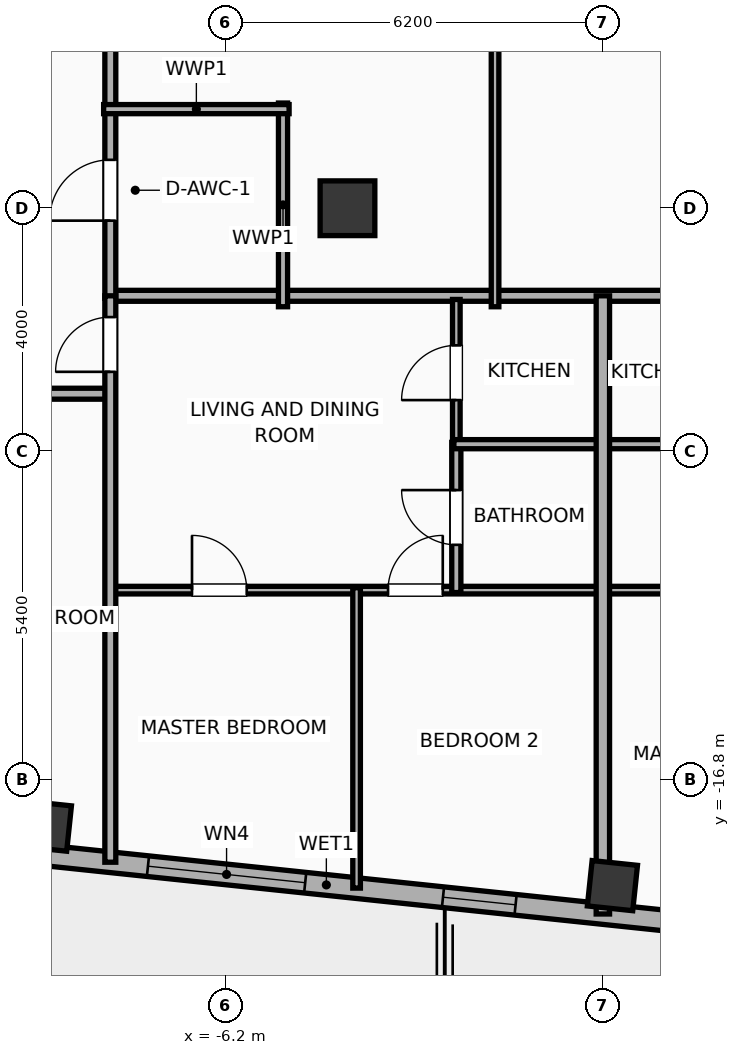
"""IFC4 building model, lengths in metres.
Left out: names, types, materials, properties, quantities, classifications, styles, units other than length and angle.
Written with IfcOpenShell. Run it as: python <this file> out.ifc"""

import sys

from ifc_helpers import new_model, si_unit, direction, frame, frame_2d, origin, origin_2d, place, context, subcontext, project, spatial, rectangle, hollow_rectangle, extrude, element, fill, save


model = new_model("IFC4")
c1 = context("Model", 3, precision=1e-05, world=origin(), true_north=direction((0.0, 1.0)))
c2 = subcontext(c1, "Body", "Model", "MODEL_VIEW")
j1 = project(units=[si_unit("LENGTHUNIT", "METRE"), si_unit("PLANEANGLEUNIT", "RADIAN")], contexts=[c1])
p1 = place(None, origin())
s1 = spatial("IfcSite", under=j1, at=p1, CompositionType="ELEMENT")
p2 = place(p1, origin())
s2 = spatial("IfcBuilding", under=s1, at=p2, CompositionType="ELEMENT")
p3 = place(p2, frame((0.0, 0.0, 291.2)))
s3 = spatial("IfcBuildingStorey", under=s2, at=p3, CompositionType="ELEMENT", Elevation=291.2)
p4 = place(p3, frame((-4.2, -7.4, 0.0), z_axis=(0.0, 0.0, 1.0), x_axis=(1.0, 0.0, 0.0)))
e1 = element("IfcColumn", 1, at=p4, inside=s3, PredefinedType="COLUMN", context=c2, shape_type="SweptSolid", body=[
    extrude(rectangle(XDim=0.9, YDim=0.9, at=origin_2d()), origin(), (0.0, 0.0, 1.0), 3.9),
])
for number, where, z_axis, x_axis in (
    (2, (-9.152, -17.561, 0.0), (0.0, 0.0, 1.0), (0.995, -0.105, 0.0)),
    (3, (0.157, -18.54, 0.0), (0.0, 0.0, 1.0), (0.995, -0.105, 0.0)),
):
    element("IfcColumn", number, at=place(p3, frame(where, z_axis=z_axis, x_axis=x_axis)), inside=s3, PredefinedType="COLUMN", context=c2, shape_type="SweptSolid", body=[
        extrude(hollow_rectangle(XDim=0.75, YDim=0.75, WallThickness=0.025, at=origin_2d()), origin(), (0.0, 0.0, 1.0), 3.9),
    ])
p5 = place(p3, frame((18.708, -20.972, 0.0), z_axis=(0.0, 0.0, 1.0), x_axis=(-0.994521888554, 0.104528528102, 0.0)))
e4 = element("IfcWall", 4, at=p5, inside=s3, PredefinedType="ELEMENTEDWALL", context=c2, shape_type="SweptSolid", body=[
    extrude(rectangle(XDim=46.766, YDim=0.34, at=frame_2d((23.383, 0.0))), origin(), (0.0, 0.0, 1.0), 3.635),
])
p6 = place(p5, frame((23.733, 0.0, 0.65)))
e5 = element("IfcOpeningElement", 5, at=p6, cuts=e4, PredefinedType="OPENING", context=c2, shape_type="SweptSolid", body=[
    extrude(rectangle(XDim=2.6, YDim=2.45, at=frame_2d((1.3, 1.225))), frame((0.0, 0.18, 0.0), z_axis=(0.0, -1.0, 0.0), x_axis=(1.0, 0.0, 0.0)), (0.0, 0.0, 1.0), 0.36),
])
p7 = place(p5, frame((44.402, 0.0, 0.75)))
e6 = element("IfcOpeningElement", 6, at=p7, cuts=e4, PredefinedType="OPENING", context=c2, shape_type="SweptSolid", body=[
    extrude(rectangle(XDim=1.2, YDim=2.05, at=frame_2d((0.6, 1.025))), frame((0.0, 0.18, 0.0), z_axis=(0.0, -1.0, 0.0), x_axis=(1.0, 0.0, 0.0)), (0.0, 0.0, 1.0), 0.36),
])
p8 = place(p5, frame((39.54, 0.0, 0.75)))
e7 = element("IfcOpeningElement", 7, at=p8, cuts=e4, PredefinedType="OPENING", context=c2, shape_type="SweptSolid", body=[
    extrude(rectangle(XDim=1.2, YDim=2.05, at=frame_2d((0.6, 1.025))), frame((0.0, 0.18, 0.0), z_axis=(0.0, -1.0, 0.0), x_axis=(1.0, 0.0, 0.0)), (0.0, 0.0, 1.0), 0.36),
])
p9 = place(p5, frame((42.406, 0.0, 0.75)))
e8 = element("IfcOpeningElement", 8, at=p9, cuts=e4, PredefinedType="OPENING", context=c2, shape_type="SweptSolid", body=[
    extrude(rectangle(XDim=1.2, YDim=2.05, at=frame_2d((0.6, 1.025))), frame((0.0, 0.18, 0.0), z_axis=(0.0, -1.0, 0.0), x_axis=(1.0, 0.0, 0.0)), (0.0, 0.0, 1.0), 0.36),
])
p10 = place(p5, frame((34.933, 0.0, 0.75)))
e9 = element("IfcOpeningElement", 9, at=p10, cuts=e4, PredefinedType="OPENING", context=c2, shape_type="SweptSolid", body=[
    extrude(rectangle(XDim=1.2, YDim=2.05, at=frame_2d((0.6, 1.025))), frame((0.0, 0.18, 0.0), z_axis=(0.0, -1.0, 0.0), x_axis=(1.0, 0.0, 0.0)), (0.0, 0.0, 1.0), 0.36),
])
p11 = place(p5, frame((28.631, 0.0, 0.75)))
e10 = element("IfcOpeningElement", 10, at=p11, cuts=e4, PredefinedType="OPENING", context=c2, shape_type="SweptSolid", body=[
    extrude(rectangle(XDim=1.2, YDim=2.05, at=frame_2d((0.6, 1.025))), frame((0.0, 0.18, 0.0), z_axis=(0.0, -1.0, 0.0), x_axis=(1.0, 0.0, 0.0)), (0.0, 0.0, 1.0), 0.36),
])
p12 = place(p5, frame((30.896, 0.0, 0.75)))
e11 = element("IfcOpeningElement", 11, at=p12, cuts=e4, PredefinedType="OPENING", context=c2, shape_type="SweptSolid", body=[
    extrude(rectangle(XDim=1.2, YDim=2.05, at=frame_2d((0.6, 1.025))), frame((0.0, 0.18, 0.0), z_axis=(0.0, -1.0, 0.0), x_axis=(1.0, 0.0, 0.0)), (0.0, 0.0, 1.0), 0.36),
])
p13 = place(p5, frame((7.501, 0.0, 0.75)))
e12 = element("IfcOpeningElement", 12, at=p13, cuts=e4, PredefinedType="OPENING", context=c2, shape_type="SweptSolid", body=[
    extrude(rectangle(XDim=1.2, YDim=2.05, at=frame_2d((0.6, 1.025))), frame((0.0, 0.18, 0.0), z_axis=(0.0, -1.0, 0.0), x_axis=(1.0, 0.0, 0.0)), (0.0, 0.0, 1.0), 0.36),
])
p14 = place(p5, frame((4.159, 0.0, 0.75)))
e13 = element("IfcOpeningElement", 13, at=p14, cuts=e4, PredefinedType="OPENING", context=c2, shape_type="SweptSolid", body=[
    extrude(rectangle(XDim=1.2, YDim=2.05, at=frame_2d((0.6, 1.025))), frame((0.0, 0.18, 0.0), z_axis=(0.0, -1.0, 0.0), x_axis=(1.0, 0.0, 0.0)), (0.0, 0.0, 1.0), 0.36),
])
p15 = place(p5, frame((1.369, 0.0, 0.75)))
e14 = element("IfcOpeningElement", 14, at=p15, cuts=e4, PredefinedType="OPENING", context=c2, shape_type="SweptSolid", body=[
    extrude(rectangle(XDim=1.2, YDim=2.05, at=frame_2d((0.6, 1.025))), frame((0.0, 0.18, 0.0), z_axis=(0.0, -1.0, 0.0), x_axis=(1.0, 0.0, 0.0)), (0.0, 0.0, 1.0), 0.36),
])
p16 = place(p5, frame((20.254, 0.0, 0.75)))
e15 = element("IfcOpeningElement", 15, at=p16, cuts=e4, PredefinedType="OPENING", context=c2, shape_type="SweptSolid", body=[
    extrude(rectangle(XDim=1.2, YDim=2.05, at=frame_2d((0.6, 1.025))), frame((0.0, 0.18, 0.0), z_axis=(0.0, -1.0, 0.0), x_axis=(1.0, 0.0, 0.0)), (0.0, 0.0, 1.0), 0.36),
])
p17 = place(p5, frame((16.172, 0.0, 0.75)))
e16 = element("IfcOpeningElement", 16, at=p17, cuts=e4, PredefinedType="OPENING", context=c2, shape_type="SweptSolid", body=[
    extrude(rectangle(XDim=1.2, YDim=2.05, at=frame_2d((0.6, 1.025))), frame((0.0, 0.18, 0.0), z_axis=(0.0, -1.0, 0.0), x_axis=(1.0, 0.0, 0.0)), (0.0, 0.0, 1.0), 0.36),
])
p18 = place(p5, frame((12.11, 0.0, 0.75)))
e17 = element("IfcOpeningElement", 17, at=p18, cuts=e4, PredefinedType="OPENING", context=c2, shape_type="SweptSolid", body=[
    extrude(rectangle(XDim=1.2, YDim=2.05, at=frame_2d((0.6, 1.025))), frame((0.0, 0.18, 0.0), z_axis=(0.0, -1.0, 0.0), x_axis=(1.0, 0.0, 0.0)), (0.0, 0.0, 1.0), 0.36),
])
p19 = place(p3, frame((-8.15, -8.84, 0.0), z_axis=(0.0, 0.0, 1.0), x_axis=(1.0, 0.0, 0.0)))
e18 = element("IfcWall", 18, at=p19, inside=s3, PredefinedType="PARTITIONING", context=c2, shape_type="SweptSolid", body=[
    extrude(rectangle(XDim=16.3, YDim=0.18, at=frame_2d((8.15, 0.0))), origin(), (0.0, 0.0, 1.0), 3.635),
])
p20 = place(p3, frame((-8.1, -8.88, 0.0), z_axis=(0.0, 0.0, 1.0), x_axis=(0.0, 1.0, 0.0)))
e19 = element("IfcWall", 19, at=p20, inside=s3, PredefinedType="PARTITIONING", context=c2, shape_type="SweptSolid", body=[
    extrude(rectangle(XDim=17.76, YDim=0.18, at=frame_2d((8.88, 0.0))), origin(), (0.0, 0.0, 1.0), 3.635),
])
p21 = place(p20, frame((1.276, 0.0, 0.0)))
e20 = element("IfcOpeningElement", 20, at=p21, cuts=e19, PredefinedType="OPENING", context=c2, shape_type="SweptSolid", body=[
    extrude(rectangle(XDim=1.0, YDim=2.05, at=frame_2d((0.5, 1.025))), frame((0.0, 0.1, 0.0), z_axis=(0.0, -1.0, 0.0), x_axis=(1.0, 0.0, 0.0)), (0.0, 0.0, 1.0), 0.2),
])
p22 = place(p20, frame((10.181, 0.0, 0.0)))
e21 = element("IfcOpeningElement", 21, at=p22, cuts=e19, PredefinedType="OPENING", context=c2, shape_type="SweptSolid", body=[
    extrude(rectangle(XDim=0.95, YDim=2.05, at=frame_2d((0.475, 1.025))), frame((0.0, 0.1, 0.0), z_axis=(0.0, -1.0, 0.0), x_axis=(1.0, 0.0, 0.0)), (0.0, 0.0, 1.0), 0.2),
])
p23 = place(p3, frame((-5.26, -9.02, 0.0), z_axis=(0.0, 0.0, 1.0), x_axis=(0.0, 1.0, 0.0)))
e22 = element("IfcWall", 22, at=p23, inside=s3, PredefinedType="PLUMBINGWALL", context=c2, shape_type="SweptSolid", body=[
    extrude(rectangle(XDim=3.35, YDim=0.15, at=frame_2d((1.675, 0.0))), origin(), (0.0, 0.0, 1.0), 3.635),
])
p24 = place(p3, frame((-8.21, -5.77, 0.0), z_axis=(0.0, 0.0, 1.0), x_axis=(1.0, 0.0, 0.0)))
e23 = element("IfcWall", 23, at=p24, inside=s3, PredefinedType="PLUMBINGWALL", context=c2, shape_type="SweptSolid", body=[
    extrude(rectangle(XDim=3.05, YDim=0.15, at=frame_2d((1.525, 0.0))), origin(), (0.0, 0.0, 1.0), 3.635),
])
p25 = place(p3, frame((-1.773, -9.02, 0.0), z_axis=(0.0, 0.0, 1.0), x_axis=(0.0, 1.0, 0.0)))
e24 = element("IfcWall", 24, at=p25, inside=s3, PredefinedType="PARTITIONING", context=c2, shape_type="SweptSolid", body=[
    extrude(rectangle(XDim=17.99, YDim=0.125, at=frame_2d((8.995, 0.0))), origin(), (0.0, 0.0, 1.0), 3.635),
])
p26 = place(p25, frame((8.52, 0.0, 0.0)))
e25 = element("IfcOpeningElement", 25, at=p26, cuts=e24, PredefinedType="OPENING", context=c2, shape_type="SweptSolid", body=[
    extrude(rectangle(XDim=0.95, YDim=2.05, at=frame_2d((0.475, 1.025))), frame((0.0, 0.073, 0.0), z_axis=(0.0, -1.0, 0.0), x_axis=(1.0, 0.0, 0.0)), (0.0, 0.0, 1.0), 0.145),
])
p27 = place(p3, frame((-30.676, -10.45, 0.0), z_axis=(0.0, 0.0, 1.0), x_axis=(1.0, 0.0, 0.0)))
e26 = element("IfcWall", 26, at=p27, inside=s3, PredefinedType="PARTITIONING", context=c2, shape_type="SweptSolid", body=[
    extrude(rectangle(XDim=22.596, YDim=0.18, at=frame_2d((11.298, 0.0))), origin(), (0.0, 0.0, 1.0), 3.635),
])
p28 = place(p27, frame((2.336, 0.0, 0.0)))
e27 = element("IfcOpeningElement", 27, at=p28, cuts=e26, PredefinedType="OPENING", context=c2, shape_type="SweptSolid", body=[
    extrude(rectangle(XDim=0.9, YDim=2.05, at=frame_2d((0.45, 1.025))), frame((0.0, 0.1, 0.0), z_axis=(0.0, -1.0, 0.0), x_axis=(1.0, 0.0, 0.0)), (0.0, 0.0, 1.0), 0.2),
])
p29 = place(p27, frame((8.861, 0.0, 0.0)))
e28 = element("IfcOpeningElement", 28, at=p29, cuts=e26, PredefinedType="OPENING", context=c2, shape_type="SweptSolid", body=[
    extrude(rectangle(XDim=1.15, YDim=2.05, at=frame_2d((0.575, 1.025))), frame((0.0, 0.1, 0.0), z_axis=(0.0, -1.0, 0.0), x_axis=(1.0, 0.0, 0.0)), (0.0, 0.0, 1.0), 0.2),
])
p30 = place(p27, frame((13.774, 0.0, 0.0)))
e29 = element("IfcOpeningElement", 29, at=p30, cuts=e26, PredefinedType="OPENING", context=c2, shape_type="SweptSolid", body=[
    extrude(rectangle(XDim=0.9, YDim=2.05, at=frame_2d((0.45, 1.025))), frame((0.0, 0.1, 0.0), z_axis=(0.0, -1.0, 0.0), x_axis=(1.0, 0.0, 0.0)), (0.0, 0.0, 1.0), 0.2),
])
p31 = place(p27, frame((20.306, 0.0, 0.0)))
e30 = element("IfcOpeningElement", 30, at=p31, cuts=e26, PredefinedType="OPENING", context=c2, shape_type="SweptSolid", body=[
    extrude(rectangle(XDim=1.15, YDim=2.05, at=frame_2d((0.575, 1.025))), frame((0.0, 0.1, 0.0), z_axis=(0.0, -1.0, 0.0), x_axis=(1.0, 0.0, 0.0)), (0.0, 0.0, 1.0), 0.2),
])
p32 = place(p3, frame((-8.08, -13.68, 0.0), z_axis=(0.0, 0.0, 1.0), x_axis=(1.0, 0.0, 0.0)))
e31 = element("IfcWall", 31, at=p32, inside=s3, PredefinedType="PARTITIONING", context=c2, shape_type="SweptSolid", body=[
    extrude(rectangle(XDim=8.06, YDim=0.125, at=frame_2d((4.03, 0.0))), origin(), (0.0, 0.0, 1.0), 3.635),
])
p33 = place(p32, frame((1.323, 0.0, 0.0)))
e32 = element("IfcOpeningElement", 32, at=p33, cuts=e31, PredefinedType="OPENING", context=c2, shape_type="SweptSolid", body=[
    extrude(rectangle(XDim=0.9, YDim=2.05, at=frame_2d((0.45, 1.025))), frame((0.0, 0.073, 0.0), z_axis=(0.0, -1.0, 0.0), x_axis=(1.0, 0.0, 0.0)), (0.0, 0.0, 1.0), 0.145),
])
p34 = place(p32, frame((4.547, 0.0, 0.0)))
e33 = element("IfcOpeningElement", 33, at=p34, cuts=e31, PredefinedType="OPENING", context=c2, shape_type="SweptSolid", body=[
    extrude(rectangle(XDim=0.9, YDim=2.05, at=frame_2d((0.45, 1.025))), frame((0.0, 0.073, 0.0), z_axis=(0.0, -1.0, 0.0), x_axis=(1.0, 0.0, 0.0)), (0.0, 0.0, 1.0), 0.145),
])
p35 = place(p3, frame((-2.41, -11.31, 0.0), z_axis=(0.0, 0.0, 1.0), x_axis=(0.0, 1.0, 0.0)))
e34 = element("IfcWall", 34, at=p35, inside=s3, PredefinedType="PARTITIONING", context=c2, shape_type="SweptSolid", body=[
    extrude(rectangle(XDim=2.41, YDim=0.125, at=frame_2d((1.205, 0.0))), origin(), (0.0, 0.0, 1.0), 3.635),
])
p36 = place(p35, frame((0.755, 0.0, 0.0)))
e35 = element("IfcOpeningElement", 35, at=p36, cuts=e34, PredefinedType="OPENING", context=c2, shape_type="SweptSolid", body=[
    extrude(rectangle(XDim=0.9, YDim=2.05, at=frame_2d((0.45, 1.025))), frame((0.0, 0.073, 0.0), z_axis=(0.0, -1.0, 0.0), x_axis=(1.0, 0.0, 0.0)), (0.0, 0.0, 1.0), 0.145),
])
p37 = place(p3, frame((-2.41, -13.72, 0.0), z_axis=(0.0, 0.0, 1.0), x_axis=(0.0, 1.0, 0.0)))
e36 = element("IfcWall", 36, at=p37, inside=s3, PredefinedType="PLUMBINGWALL", context=c2, shape_type="SweptSolid", body=[
    extrude(rectangle(XDim=2.47, YDim=0.15, at=frame_2d((1.235, 0.0))), origin(), (0.0, 0.0, 1.0), 3.635),
])
p38 = place(p37, frame((0.785, 0.0, 0.0)))
e37 = element("IfcOpeningElement", 37, at=p38, cuts=e36, PredefinedType="OPENING", context=c2, shape_type="SweptSolid", body=[
    extrude(rectangle(XDim=0.9, YDim=2.05, at=frame_2d((0.45, 1.025))), frame((0.0, 0.085, 0.0), z_axis=(0.0, -1.0, 0.0), x_axis=(1.0, 0.0, 0.0)), (0.0, 0.0, 1.0), 0.17),
])
p39 = place(p3, frame((-2.45, -11.28, 0.0), z_axis=(0.0, 0.0, 1.0), x_axis=(1.0, 0.0, 0.0)))
e38 = element("IfcWall", 38, at=p39, inside=s3, PredefinedType="PLUMBINGWALL", context=c2, shape_type="SweptSolid", body=[
    extrude(rectangle(XDim=2.43, YDim=0.15, at=frame_2d((1.215, 0.0))), origin(), (0.0, 0.0, 1.0), 3.635),
])
p40 = place(p3, frame((-4.05, -18.58, 0.0), z_axis=(0.0, 0.0, 1.0), x_axis=(0.0, 1.0, 0.0)))
e39 = element("IfcWall", 39, at=p40, inside=s3, PredefinedType="PARTITIONING", context=c2, shape_type="SweptSolid", body=[
    extrude(rectangle(XDim=4.94, YDim=0.125, at=frame_2d((2.47, 0.0))), origin(), (0.0, 0.0, 1.0), 3.635),
])
p41 = place(p3, frame((-8.1, -18.155, 0.0), z_axis=(0.0, 0.0, 1.0), x_axis=(0.0, 1.0, 0.0)))
e40 = element("IfcWall", 40, at=p41, inside=s3, PredefinedType="PARTITIONING", context=c2, shape_type="SweptSolid", body=[
    extrude(rectangle(XDim=9.314, YDim=0.18, at=frame_2d((4.657, 0.0))), origin(), (0.0, 0.0, 1.0), 3.635),
])
p42 = place(p41, frame((8.064, 0.0, 0.0)))
e41 = element("IfcOpeningElement", 41, at=p42, cuts=e40, PredefinedType="OPENING", context=c2, shape_type="SweptSolid", body=[
    extrude(rectangle(XDim=0.9, YDim=2.05, at=frame_2d((0.45, 1.025))), frame((0.0, 0.1, 0.0), z_axis=(0.0, -1.0, 0.0), x_axis=(1.0, 0.0, 0.0)), (0.0, 0.0, 1.0), 0.2),
])
p43 = place(p3, frame((0.02, -13.68, 0.0), z_axis=(0.0, 0.0, 1.0), x_axis=(1.0, 0.0, 0.0)))
e42 = element("IfcWall", 42, at=p43, inside=s3, PredefinedType="PARTITIONING", context=c2, shape_type="SweptSolid", body=[
    extrude(rectangle(XDim=7.992, YDim=0.125, at=frame_2d((3.996, 0.0))), origin(), (0.0, 0.0, 1.0), 3.635),
])
p44 = place(p43, frame((1.323, 0.0, 0.0)))
e43 = element("IfcOpeningElement", 43, at=p44, cuts=e42, PredefinedType="OPENING", context=c2, shape_type="SweptSolid", body=[
    extrude(rectangle(XDim=0.9, YDim=2.05, at=frame_2d((0.45, 1.025))), frame((0.0, 0.073, 0.0), z_axis=(0.0, -1.0, 0.0), x_axis=(1.0, 0.0, 0.0)), (0.0, 0.0, 1.0), 0.145),
])
p45 = place(p43, frame((5.837, 0.0, 0.0)))
e44 = element("IfcOpeningElement", 44, at=p45, cuts=e42, PredefinedType="OPENING", context=c2, shape_type="SweptSolid", body=[
    extrude(rectangle(XDim=0.9, YDim=2.05, at=frame_2d((0.45, 1.025))), frame((0.0, 0.073, 0.0), z_axis=(0.0, -1.0, 0.0), x_axis=(1.0, 0.0, 0.0)), (0.0, 0.0, 1.0), 0.145),
])
p46 = place(p3, frame((0.02, -11.28, 0.0), z_axis=(0.0, 0.0, 1.0), x_axis=(1.0, 0.0, 0.0)))
e45 = element("IfcWall", 45, at=p46, inside=s3, PredefinedType="PLUMBINGWALL", context=c2, shape_type="SweptSolid", body=[
    extrude(rectangle(XDim=2.43, YDim=0.15, at=frame_2d((1.215, 0.0))), origin(), (0.0, 0.0, 1.0), 3.635),
])
p47 = place(p3, frame((0.0, -19.006, 0.0), z_axis=(0.0, 0.0, 1.0), x_axis=(0.0, 1.0, 0.0)))
e46 = element("IfcWall", 46, at=p47, inside=s3, PredefinedType="PARTITIONING", context=c2, shape_type="SweptSolid", body=[
    extrude(rectangle(XDim=10.166, YDim=0.22, at=frame_2d((5.083, 0.0))), origin(), (0.0, 0.0, 1.0), 3.635),
])
p48 = place(p6, origin())
e47 = element("IfcWindow", 47, at=p48, inside=s3, PartitioningType="SINGLE_PANEL", PredefinedType="WINDOW", context=c2, shape_type="SweptSolid", body=[
    extrude(rectangle(XDim=2.6, YDim=2.45, at=frame_2d((1.3, 1.225))), frame((0.0, 0.03, 0.0), z_axis=(0.0, -1.0, 0.0), x_axis=(1.0, 0.0, 0.0)), (0.0, 0.0, 1.0), 0.06),
])
fill(e5, e47)
p49 = place(p16, origin())
e48 = element("IfcWindow", 48, at=p49, inside=s3, PartitioningType="SINGLE_PANEL", PredefinedType="WINDOW", context=c2, shape_type="SweptSolid", body=[
    extrude(rectangle(XDim=1.2, YDim=2.05, at=frame_2d((0.6, 1.025))), frame((0.0, 0.03, 0.0), z_axis=(0.0, -1.0, 0.0), x_axis=(1.0, 0.0, 0.0)), (0.0, 0.0, 1.0), 0.06),
])
fill(e15, e48)
p50 = place(p21, origin())
e49 = element("IfcDoor", 49, at=p50, inside=s3, OperationType="SINGLE_SWING_LEFT", PredefinedType="DOOR", context=c2, shape_type="SweptSolid", body=[
    extrude(rectangle(XDim=1.0, YDim=2.05, at=frame_2d((0.5, 1.025))), frame((0.0, 0.025, 0.0), z_axis=(0.0, -1.0, 0.0), x_axis=(1.0, 0.0, 0.0)), (0.0, 0.0, 1.0), 0.05),
])
fill(e20, e49)
p51 = place(p33, origin())
e50 = element("IfcDoor", 50, at=p51, inside=s3, OperationType="SINGLE_SWING_LEFT", PredefinedType="DOOR", context=c2, shape_type="SweptSolid", body=[
    extrude(rectangle(XDim=0.9, YDim=2.05, at=frame_2d((0.45, 1.025))), frame((0.0, 0.025, 0.0), z_axis=(0.0, -1.0, 0.0), x_axis=(1.0, 0.0, 0.0)), (0.0, 0.0, 1.0), 0.05),
])
fill(e32, e50)
p52 = place(p34, origin())
e51 = element("IfcDoor", 51, at=p52, inside=s3, OperationType="SINGLE_SWING_RIGHT", PredefinedType="DOOR", context=c2, shape_type="SweptSolid", body=[
    extrude(rectangle(XDim=0.9, YDim=2.05, at=frame_2d((0.45, 1.025))), frame((0.0, 0.025, 0.0), z_axis=(0.0, -1.0, 0.0), x_axis=(1.0, 0.0, 0.0)), (0.0, 0.0, 1.0), 0.05),
])
fill(e33, e51)
p53 = place(p36, origin())
e52 = element("IfcDoor", 52, at=p53, inside=s3, OperationType="SINGLE_SWING_LEFT", PredefinedType="DOOR", context=c2, shape_type="SweptSolid", body=[
    extrude(rectangle(XDim=0.9, YDim=2.05, at=frame_2d((0.45, 1.025))), frame((0.0, 0.025, 0.0), z_axis=(0.0, -1.0, 0.0), x_axis=(1.0, 0.0, 0.0)), (0.0, 0.0, 1.0), 0.05),
])
fill(e35, e52)
p54 = place(p38, origin())
e53 = element("IfcDoor", 53, at=p54, inside=s3, OperationType="SINGLE_SWING_RIGHT", PredefinedType="DOOR", context=c2, shape_type="SweptSolid", body=[
    extrude(rectangle(XDim=0.9, YDim=2.05, at=frame_2d((0.45, 1.025))), frame((0.0, 0.025, 0.0), z_axis=(0.0, -1.0, 0.0), x_axis=(1.0, 0.0, 0.0)), (0.0, 0.0, 1.0), 0.05),
])
fill(e37, e53)
p55 = place(p42, origin())
e54 = element("IfcDoor", 54, at=p55, inside=s3, OperationType="SINGLE_SWING_LEFT", PredefinedType="DOOR", context=c2, shape_type="SweptSolid", body=[
    extrude(rectangle(XDim=0.9, YDim=2.05, at=frame_2d((0.45, 1.025))), frame((0.0, 0.025, 0.0), z_axis=(0.0, -1.0, 0.0), x_axis=(1.0, 0.0, 0.0)), (0.0, 0.0, 1.0), 0.05),
])
fill(e41, e54)
save(model, sys.argv[1])
